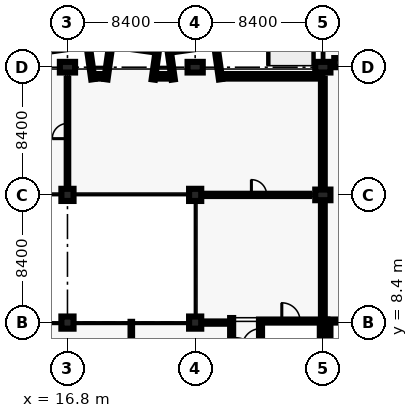
"""IFC4 building model, lengths in metres.
Left out: names, types, materials, properties, quantities, classifications, styles, units other than length and angle.
Written with IfcOpenShell. Run it as: python <this file> out.ifc"""

import sys

from ifc_helpers import new_model, si_unit, direction, frame, frame_2d, origin, origin_2d, place, context, subcontext, project, spatial, rectangle, extrude, element, fill, save


model = new_model("IFC4")
c1 = context("Model", 3, precision=1e-05, world=origin(), true_north=direction((0.0, 1.0)))
c2 = subcontext(c1, "Body", "Model", "MODEL_VIEW")
j1 = project(units=[si_unit("LENGTHUNIT", "METRE"), si_unit("PLANEANGLEUNIT", "RADIAN")], contexts=[c1])
p1 = place(None, origin())
s1 = spatial("IfcSite", under=j1, at=p1, CompositionType="ELEMENT")
p2 = place(p1, origin())
s2 = spatial("IfcBuilding", under=s1, at=p2, CompositionType="ELEMENT")
p3 = place(p2, frame((0.0, 0.0, 10.2)))
s3 = spatial("IfcBuildingStorey", under=s2, at=p3, CompositionType="ELEMENT", Elevation=10.2)
p4 = place(p3, frame((29.4, 8.5, 0.0), z_axis=(0.0, 0.0, 1.0), x_axis=(1.0, 0.0, 0.0)))
e1 = element("IfcWall", 1, at=p4, inside=s3, PredefinedType="SHEAR", context=c2, shape_type="SweptSolid", body=[
    extrude(rectangle(XDim=4.2, YDim=0.2, at=frame_2d((2.1, 0.0))), origin(), (0.0, 0.0, 1.0), 4.8),
])
p5 = place(p4, frame((1.5, 0.0, 0.0)))
e2 = element("IfcOpeningElement", 2, at=p5, cuts=e1, PredefinedType="OPENING", context=c2, shape_type="SweptSolid", body=[
    extrude(rectangle(XDim=1.2, YDim=2.1, at=frame_2d((0.6, 1.05))), frame((0.0, 0.11, 0.0), z_axis=(0.0, -1.0, 0.0), x_axis=(1.0, 0.0, 0.0)), (0.0, 0.0, 1.0), 0.22),
])
p6 = place(p3, frame((29.5, 0.2, 0.0), z_axis=(0.0, 0.0, 1.0), x_axis=(0.0, 1.0, 0.0)))
e3 = element("IfcWall", 3, at=p6, inside=s3, PredefinedType="SHEAR", context=c2, shape_type="SweptSolid", body=[
    extrude(rectangle(XDim=8.2, YDim=0.2, at=frame_2d((4.1, 0.0))), origin(), (0.0, 0.0, 1.0), 4.8),
])
p7 = place(p6, frame((6.6, 0.0, 0.0)))
e4 = element("IfcOpeningElement", 4, at=p7, cuts=e3, PredefinedType="OPENING", context=c2, shape_type="SweptSolid", body=[
    extrude(rectangle(XDim=1.2, YDim=2.1, at=frame_2d((0.6, 1.05))), frame((0.0, 0.11, 0.0), z_axis=(0.0, -1.0, 0.0), x_axis=(1.0, 0.0, 0.0)), (0.0, 0.0, 1.0), 0.22),
])
p8 = place(p3, frame((33.5, 8.4, 0.0), z_axis=(0.0, 0.0, 1.0), x_axis=(0.0, -1.0, 0.0)))
e5 = element("IfcWall", 5, at=p8, inside=s3, PredefinedType="SHEAR", context=c2, shape_type="SweptSolid", body=[
    extrude(rectangle(XDim=8.2, YDim=0.2, at=frame_2d((4.1, 0.0))), origin(), (0.0, 0.0, 1.0), 4.8),
])
p9 = place(p3, frame((33.9, 8.5, 0.0), z_axis=(0.0, 0.0, 1.0), x_axis=(1.0, 0.0, 0.0)))
e6 = element("IfcWall", 6, at=p9, inside=s3, PredefinedType="SHEAR", context=c2, shape_type="SweptSolid", body=[
    extrude(rectangle(XDim=3.9, YDim=0.2, at=frame_2d((1.95, 0.0))), origin(), (0.0, 0.0, 1.0), 4.8),
])
p10 = place(p9, frame((1.2, 0.0, 0.0)))
e7 = element("IfcOpeningElement", 7, at=p10, cuts=e6, PredefinedType="OPENING", context=c2, shape_type="SweptSolid", body=[
    extrude(rectangle(XDim=1.2, YDim=2.1, at=frame_2d((0.6, 1.05))), frame((0.0, 0.11, 0.0), z_axis=(0.0, -1.0, 0.0), x_axis=(1.0, 0.0, 0.0)), (0.0, 0.0, 1.0), 0.22),
])
p11 = place(p3, frame((34.0, 0.2, 0.0), z_axis=(0.0, 0.0, 1.0), x_axis=(0.0, 1.0, 0.0)))
e8 = element("IfcWall", 8, at=p11, inside=s3, PredefinedType="SHEAR", context=c2, shape_type="SweptSolid", body=[
    extrude(rectangle(XDim=8.2, YDim=0.2, at=frame_2d((4.1, 0.0))), origin(), (0.0, 0.0, 1.0), 4.8),
])
for number, where, z_axis, x_axis in (
    (9, (16.8, 8.4, 0.0), (0.0, 0.0, 1.0), (1.0, 0.0, 0.0)),
    (10, (16.8, 16.8, 0.0), (0.0, 0.0, 1.0), (1.0, 0.0, 0.0)),
):
    element("IfcColumn", number, at=place(p3, frame(where, z_axis=z_axis, x_axis=x_axis)), inside=s3, PredefinedType="COLUMN", context=c2, shape_type="SweptSolid", body=[
        extrude(rectangle(XDim=0.8, YDim=0.8, at=origin_2d()), origin(), (0.0, 0.0, 1.0), 4.8),
    ])
p12 = place(p3, frame((16.8, 25.2, 0.0), z_axis=(0.0, 0.0, 1.0), x_axis=(1.0, 0.0, 0.0)))
e11 = element("IfcColumn", 11, at=p12, inside=s3, PredefinedType="COLUMN", context=c2, shape_type="SweptSolid", body=[
    extrude(rectangle(XDim=1.0, YDim=0.7, at=origin_2d()), origin(), (0.0, 0.0, 1.0), 4.8),
])
for number, where, z_axis, x_axis in (
    (12, (25.2, 8.4, 0.0), (0.0, 0.0, 1.0), (1.0, 0.0, 0.0)),
    (13, (25.2, 16.8, 0.0), (0.0, 0.0, 1.0), (1.0, 0.0, 0.0)),
):
    element("IfcColumn", number, at=place(p3, frame(where, z_axis=z_axis, x_axis=x_axis)), inside=s3, PredefinedType="COLUMN", context=c2, shape_type="SweptSolid", body=[
        extrude(rectangle(XDim=0.8, YDim=0.8, at=origin_2d()), origin(), (0.0, 0.0, 1.0), 4.8),
    ])
for number, where, z_axis, x_axis in (
    (14, (25.2, 25.2, 0.0), (0.0, 0.0, 1.0), (1.0, 0.0, 0.0)),
    (15, (33.6, 16.8, 0.0), (0.0, 0.0, 1.0), (0.0, 1.0, 0.0)),
    (16, (33.6, 25.2, 0.0), (0.0, 0.0, 1.0), (1.0, 0.0, 0.0)),
):
    element("IfcColumn", number, at=place(p3, frame(where, z_axis=z_axis, x_axis=x_axis)), inside=s3, PredefinedType="COLUMN", context=c2, shape_type="SweptSolid", body=[
        extrude(rectangle(XDim=1.0, YDim=0.7, at=origin_2d()), origin(), (0.0, 0.0, 1.0), 4.8),
    ])
p13 = place(p3, frame((34.65, 25.5, 0.0), z_axis=(0.0, 0.0, 1.0), x_axis=(1.0, 0.0, 0.0)))
e17 = element("IfcColumn", 17, at=p13, inside=s3, PredefinedType="COLUMN", context=c2, shape_type="SweptSolid", body=[
    extrude(rectangle(XDim=0.6, YDim=0.6, at=origin_2d()), origin(), (0.0, 0.0, 1.0), 4.8),
])
p14 = place(p3, frame((33.6, 8.5, 0.0), z_axis=(0.0, 0.0, 1.0), x_axis=(1.0, 0.0, 0.0)))
e18 = element("IfcWall", 18, at=p14, inside=s3, PredefinedType="SHEAR", context=c2, shape_type="SweptSolid", body=[
    extrude(rectangle(XDim=0.3, YDim=0.2, at=frame_2d((0.15, 0.0))), origin(), (0.0, 0.0, 1.0), 4.8),
])
p15 = place(p3, frame((18.469, 24.405, 0.0), z_axis=(0.0, 0.0, 1.0), x_axis=(-0.139249775508, 0.99025728981, 0.0)))
e19 = element("IfcWall", 19, at=p15, inside=s3, PredefinedType="SOLIDWALL", context=c2, shape_type="SweptSolid", body=[
    extrude(rectangle(XDim=2.22, YDim=0.215, at=frame_2d((1.11, 0.0))), origin(), (0.0, 0.0, 1.0), 4.5),
])
p16 = place(p3, frame((19.331, 24.405, 0.0), z_axis=(0.0, 0.0, 1.0), x_axis=(0.139141913905, 0.990272451295, 0.0)))
e20 = element("IfcWall", 20, at=p16, inside=s3, PredefinedType="SOLIDWALL", context=c2, shape_type="SweptSolid", body=[
    extrude(rectangle(XDim=2.219, YDim=0.215, at=frame_2d((1.11, 0.0))), origin(), (0.0, 0.0, 1.0), 4.5),
])
for number, where, z_axis, x_axis in (
    (21, (22.444, 24.391, 0.0), (0.0, 0.0, 1.0), (0.139, 0.99, 0.0)),
    (22, (23.756, 24.391, 0.0), (0.0, 0.0, 1.0), (-0.139, 0.99, 0.0)),
):
    element("IfcWall", number, at=place(p3, frame(where, z_axis=z_axis, x_axis=x_axis)), inside=s3, PredefinedType="SOLIDWALL", context=c2, shape_type="SweptSolid", body=[
        extrude(rectangle(XDim=1.8, YDim=0.215, at=frame_2d((0.9, 0.0))), origin(), (0.0, 0.0, 1.0), 4.5),
    ])
p17 = place(p3, frame((26.869, 24.405, 0.0), z_axis=(0.0, 0.0, 1.0), x_axis=(-0.139141913905, 0.990272451295, 0.0)))
e23 = element("IfcWall", 23, at=p17, inside=s3, PredefinedType="SOLIDWALL", context=c2, shape_type="SweptSolid", body=[
    extrude(rectangle(XDim=2.219, YDim=0.215, at=frame_2d((1.11, 0.0))), origin(), (0.0, 0.0, 1.0), 4.5),
])
p18 = place(p3, frame((18.551, 24.6, 0.0), z_axis=(0.0, 0.0, 1.0), x_axis=(1.0, 0.0, 0.0)))
e24 = element("IfcWall", 24, at=p18, inside=s3, PredefinedType="SOLIDWALL", context=c2, shape_type="SweptSolid", body=[
    extrude(rectangle(XDim=0.699, YDim=0.3, at=frame_2d((0.35, 0.0))), origin(), (0.0, 0.0, 1.0), 4.5),
])
p19 = place(p3, frame((22.582, 24.6, 0.0), z_axis=(0.0, 0.0, 1.0), x_axis=(1.0, 0.0, 0.0)))
e25 = element("IfcWall", 25, at=p19, inside=s3, PredefinedType="SOLIDWALL", context=c2, shape_type="SweptSolid", body=[
    extrude(rectangle(XDim=1.036, YDim=0.3, at=frame_2d((0.518, 0.0))), origin(), (0.0, 0.0, 1.0), 4.5),
])
p20 = place(p3, frame((26.95, 24.6, 0.0), z_axis=(0.0, 0.0, 1.0), x_axis=(1.0, 0.0, 0.0)))
e26 = element("IfcWall", 26, at=p20, inside=s3, PredefinedType="SOLIDWALL", context=c2, shape_type="SweptSolid", body=[
    extrude(rectangle(XDim=6.525, YDim=0.3, at=frame_2d((3.262, 0.0))), origin(), (0.0, 0.0, 1.0), 4.5),
])
p21 = place(p20, frame((1.825, 0.0, 0.9)))
e27 = element("IfcOpeningElement", 27, at=p21, cuts=e26, PredefinedType="OPENING", context=c2, shape_type="SweptSolid", body=[
    extrude(rectangle(XDim=2.4, YDim=1.5, at=frame_2d((1.2, 0.75))), frame((0.0, 0.16, 0.0), z_axis=(0.0, -1.0, 0.0), x_axis=(1.0, 0.0, 0.0)), (0.0, 0.0, 1.0), 0.32),
])
p22 = place(p3, frame((33.6, 8.6, 0.0), z_axis=(0.0, 0.0, 1.0), x_axis=(0.0, 1.0, 0.0)))
e28 = element("IfcWall", 28, at=p22, inside=s3, PredefinedType="SOLIDWALL", context=c2, shape_type="SweptSolid", body=[
    extrude(rectangle(XDim=15.85, YDim=0.25, at=frame_2d((7.925, 0.0))), origin(), (0.0, 0.0, 1.0), 3.8),
])
p23 = place(p3, frame((27.6, 6.3, 0.0), z_axis=(0.0, 0.0, 1.0), x_axis=(0.0, 1.0, 0.0)))
e29 = element("IfcWall", 29, at=p23, inside=s3, PredefinedType="SOLIDWALL", context=c2, shape_type="SweptSolid", body=[
    extrude(rectangle(XDim=2.4, YDim=0.2, at=frame_2d((1.2, 0.0))), origin(), (0.0, 0.0, 1.0), 4.0),
])
p24 = place(p3, frame((25.125, 8.4, 0.0), z_axis=(0.0, 0.0, 1.0), x_axis=(1.0, 0.0, 0.0)))
e30 = element("IfcWall", 30, at=p24, inside=s3, PredefinedType="PARTITIONING", context=c2, shape_type="SweptSolid", body=[
    extrude(rectangle(XDim=2.375, YDim=0.15, at=frame_2d((1.188, 0.0))), origin(), (0.0, 0.0, 1.0), 3.8),
])
p25 = place(p3, frame((25.125, 16.8, 0.0), z_axis=(0.0, 0.0, 1.0), x_axis=(1.0, 0.0, 0.0)))
e31 = element("IfcWall", 31, at=p25, inside=s3, PredefinedType="PARTITIONING", context=c2, shape_type="SweptSolid", body=[
    extrude(rectangle(XDim=7.575, YDim=0.15, at=frame_2d((3.788, 0.0))), origin(), (0.0, 0.0, 1.0), 3.8),
])
p26 = place(p25, frame((3.775, 0.0, 0.0)))
e32 = element("IfcOpeningElement", 32, at=p26, cuts=e31, PredefinedType="OPENING", context=c2, shape_type="SweptSolid", body=[
    extrude(rectangle(XDim=1.0, YDim=2.1, at=frame_2d((0.5, 1.05))), frame((0.0, 0.085, 0.0), z_axis=(0.0, -1.0, 0.0), x_axis=(1.0, 0.0, 0.0)), (0.0, 0.0, 1.0), 0.17),
])
p27 = place(p3, frame((16.8, 16.75, 0.0), z_axis=(0.0, 0.0, 1.0), x_axis=(0.0, 1.0, 0.0)))
e33 = element("IfcWall", 33, at=p27, inside=s3, PredefinedType="PARTITIONING", context=c2, shape_type="SweptSolid", body=[
    extrude(rectangle(XDim=7.7, YDim=0.1, at=frame_2d((3.85, 0.0))), origin(), (0.0, 0.0, 1.0), 3.8),
])
p28 = place(p27, frame((3.75, 0.0, 0.0)))
e34 = element("IfcOpeningElement", 34, at=p28, cuts=e33, PredefinedType="OPENING", context=c2, shape_type="SweptSolid", body=[
    extrude(rectangle(XDim=1.0, YDim=2.1, at=frame_2d((0.5, 1.05))), frame((0.0, 0.06, 0.0), z_axis=(0.0, -1.0, 0.0), x_axis=(1.0, 0.0, 0.0)), (0.0, 0.0, 1.0), 0.12),
])
p29 = place(p3, frame((21.0, 0.75, 0.0), z_axis=(0.0, 0.0, 1.0), x_axis=(0.0, 1.0, 0.0)))
e35 = element("IfcWall", 35, at=p29, inside=s3, PredefinedType="PARTITIONING", context=c2, shape_type="SweptSolid", body=[
    extrude(rectangle(XDim=7.7, YDim=0.1, at=frame_2d((3.85, 0.0))), origin(), (0.0, 0.0, 1.0), 3.8),
])
p30 = place(p29, frame((2.95, 0.0, 0.0)))
e36 = element("IfcOpeningElement", 36, at=p30, cuts=e35, PredefinedType="OPENING", context=c2, shape_type="SweptSolid", body=[
    extrude(rectangle(XDim=1.0, YDim=2.1, at=frame_2d((0.5, 1.05))), frame((0.0, 0.06, 0.0), z_axis=(0.0, -1.0, 0.0), x_axis=(1.0, 0.0, 0.0)), (0.0, 0.0, 1.0), 0.12),
])
p31 = place(p21, origin())
e37 = element("IfcWindow", 37, at=p31, inside=s3, PartitioningType="SINGLE_PANEL", PredefinedType="WINDOW", context=c2, shape_type="SweptSolid", body=[
    extrude(rectangle(XDim=2.4, YDim=1.5, at=frame_2d((1.2, 0.75))), frame((0.0, 0.03, 0.0), z_axis=(0.0, -1.0, 0.0), x_axis=(1.0, 0.0, 0.0)), (0.0, 0.0, 1.0), 0.06),
])
fill(e27, e37)
p32 = place(p7, origin())
e38 = element("IfcDoor", 38, at=p32, inside=s3, OperationType="SINGLE_SWING_RIGHT", PredefinedType="DOOR", context=c2, shape_type="SweptSolid", body=[
    extrude(rectangle(XDim=1.2, YDim=2.1, at=frame_2d((0.6, 1.05))), frame((0.0, 0.025, 0.0), z_axis=(0.0, -1.0, 0.0), x_axis=(1.0, 0.0, 0.0)), (0.0, 0.0, 1.0), 0.05),
])
fill(e4, e38)
p33 = place(p5, origin())
e39 = element("IfcDoor", 39, at=p33, inside=s3, OperationType="SINGLE_SWING_RIGHT", PredefinedType="DOOR", context=c2, shape_type="SweptSolid", body=[
    extrude(rectangle(XDim=1.2, YDim=2.1, at=frame_2d((0.6, 1.05))), frame((0.0, 0.025, 0.0), z_axis=(0.0, -1.0, 0.0), x_axis=(1.0, 0.0, 0.0)), (0.0, 0.0, 1.0), 0.05),
])
fill(e2, e39)
p34 = place(p26, origin())
e40 = element("IfcDoor", 40, at=p34, inside=s3, OperationType="SINGLE_SWING_LEFT", PredefinedType="DOOR", context=c2, shape_type="SweptSolid", body=[
    extrude(rectangle(XDim=1.0, YDim=2.1, at=frame_2d((0.5, 1.05))), frame((0.0, 0.025, 0.0), z_axis=(0.0, -1.0, 0.0), x_axis=(1.0, 0.0, 0.0)), (0.0, 0.0, 1.0), 0.05),
])
fill(e32, e40)
p35 = place(p28, origin())
e41 = element("IfcDoor", 41, at=p35, inside=s3, OperationType="SINGLE_SWING_RIGHT", PredefinedType="DOOR", context=c2, shape_type="SweptSolid", body=[
    extrude(rectangle(XDim=1.0, YDim=2.1, at=frame_2d((0.5, 1.05))), frame((0.0, 0.025, 0.0), z_axis=(0.0, -1.0, 0.0), x_axis=(1.0, 0.0, 0.0)), (0.0, 0.0, 1.0), 0.05),
])
fill(e34, e41)
save(model, sys.argv[1])
